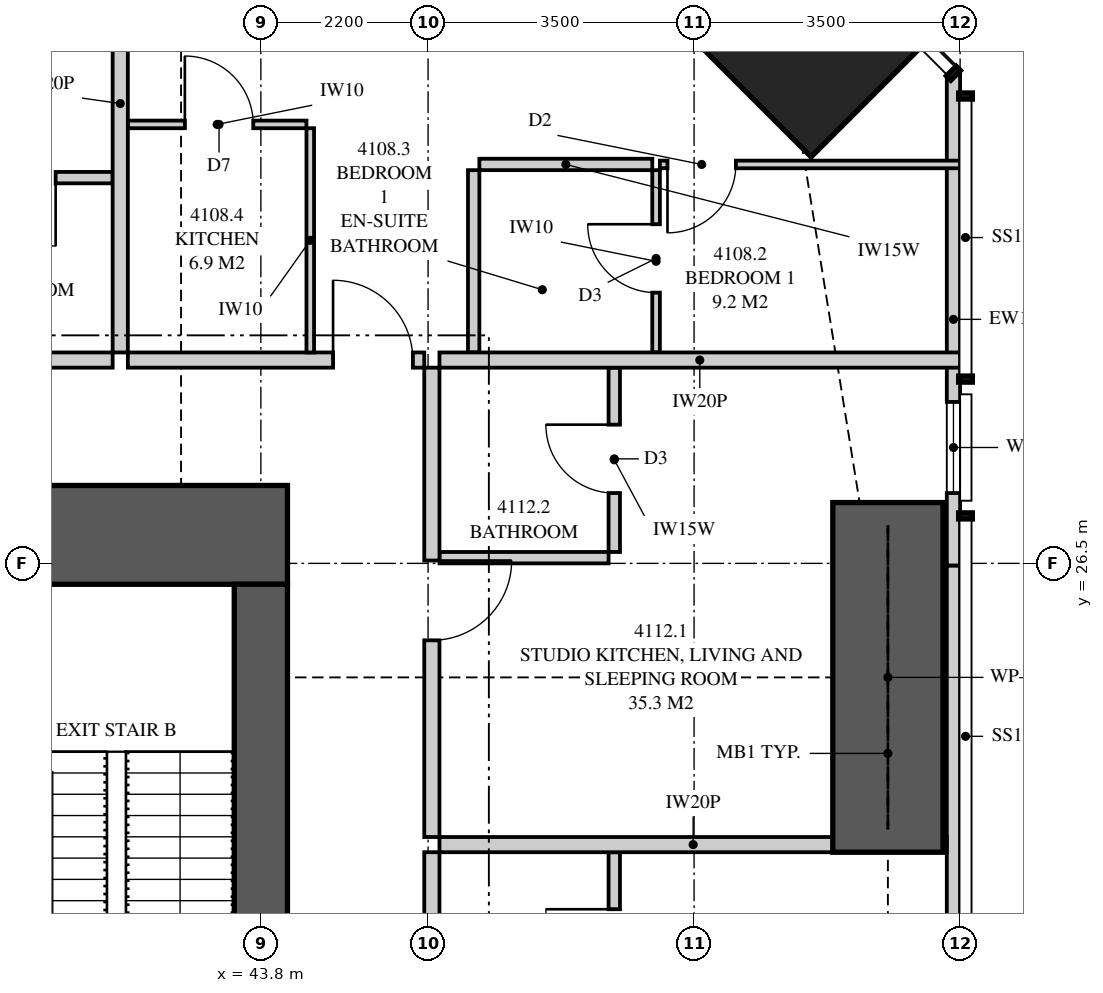
"""IFC4 building model, lengths in metres.
Left out: names, types, materials, properties, quantities, classifications, styles, units other than length and angle.
Written with IfcOpenShell. Run it as: python <this file> out.ifc"""

import sys

from ifc_helpers import new_model, si_unit, direction, frame, frame_2d, origin, origin_2d, place, context, subcontext, project, spatial, polyline, rectangle, hollow_rectangle, outline, extrude, element, fill, save


model = new_model("IFC4")
c1 = context("Model", 3, precision=1e-05, world=origin(), true_north=direction((0.0, 1.0)))
c2 = subcontext(c1, "Body", "Model", "MODEL_VIEW")
j1 = project(units=[si_unit("LENGTHUNIT", "METRE"), si_unit("PLANEANGLEUNIT", "RADIAN")], contexts=[c1])
p1 = place(None, origin())
s1 = spatial("IfcSite", under=j1, at=p1, CompositionType="ELEMENT")
p2 = place(p1, origin())
s2 = spatial("IfcBuilding", under=s1, at=p2, CompositionType="ELEMENT")
p3 = place(p2, frame((0.0, 0.0, 154.35)))
s3 = spatial("IfcBuildingStorey", under=s2, at=p3, CompositionType="ELEMENT", Elevation=154.35)
p4 = place(p3, frame((50.652, 33.652, 0.0), z_axis=(0.0, 0.0, 1.0), x_axis=(-0.707106781187, -0.707106781187, 0.0)))
e1 = element("IfcColumn", 1, at=p4, inside=s3, PredefinedType="COLUMN", context=c2, shape_type="SweptSolid", body=[
    extrude(hollow_rectangle(XDim=2.0, YDim=3.1, WallThickness=0.125, at=origin_2d()), origin(), (0.0, 0.0, 1.0), 3.35),
])
p5 = place(p3, frame((44.15, 26.875, 0.0), z_axis=(0.0, 0.0, 1.0), x_axis=(-1.0, 0.0, 0.0)))
e2 = element("IfcWall", 2, at=p5, inside=s3, PredefinedType="SHEAR", context=c2, shape_type="SweptSolid", body=[
    extrude(rectangle(XDim=8.25, YDim=1.3, at=frame_2d((4.125, 0.0))), origin(), (0.0, 0.0, 1.0), 3.35),
])
p6 = place(p5, frame((5.65, 0.0, 0.0)))
e3 = element("IfcOpeningElement", 3, at=p6, cuts=e2, PredefinedType="OPENING", context=c2, shape_type="SweptSolid", body=[
    extrude(rectangle(XDim=0.9, YDim=2.1, at=frame_2d((0.45, 1.05))), frame((0.0, 0.66, 0.0), z_axis=(0.0, -1.0, 0.0), x_axis=(1.0, 0.0, 0.0)), (0.0, 0.0, 1.0), 1.32),
])
p7 = place(p3, frame((43.8, 19.3, 0.0), z_axis=(0.0, 0.0, 1.0), x_axis=(0.0, 1.0, 0.0)))
e4 = element("IfcWall", 4, at=p7, inside=s3, PredefinedType="SHEAR", context=c2, shape_type="SweptSolid", body=[
    extrude(rectangle(XDim=6.925, YDim=0.7, at=frame_2d((3.462, 0.0))), origin(), (0.0, 0.0, 1.0), 3.35),
])
p8 = place(p3, frame((52.913, 11.221, 0.0), z_axis=(0.0, 0.0, 1.0), x_axis=(0.0, 1.0, 0.0)))
e5 = element("IfcWall", 5, at=p8, inside=s3, PredefinedType="SOLIDWALL", context=c2, shape_type="SweptSolid", body=[
    extrude(rectangle(XDim=15.251, YDim=0.175, at=frame_2d((7.625, 0.0))), origin(), (0.0, 0.0, 1.0), 2.15),
])
p9 = place(p8, frame((7.104, 0.0, 0.0)))
e6 = element("IfcOpeningElement", 6, at=p9, cuts=e5, PredefinedType="OPENING", context=c2, shape_type="SweptSolid", body=[
    extrude(rectangle(XDim=1.8, YDim=2.1, at=frame_2d((0.9, 1.05))), frame((0.0, 0.097, 0.0), z_axis=(0.0, -1.0, 0.0), x_axis=(1.0, 0.0, 0.0)), (0.0, 0.0, 1.0), 0.195),
])
p10 = place(p8, frame((4.179, 0.0, 0.4)))
e7 = element("IfcOpeningElement", 7, at=p10, cuts=e5, PredefinedType="OPENING", context=c2, shape_type="SweptSolid", body=[
    extrude(rectangle(XDim=2.4, YDim=1.7, at=frame_2d((1.2, 0.85))), frame((0.0, 0.097, 0.0), z_axis=(0.0, -1.0, 0.0), x_axis=(1.0, 0.0, 0.0)), (0.0, 0.0, 1.0), 0.195),
])
p11 = place(p3, frame((52.913, 26.472, 0.0), z_axis=(0.0, 0.0, 1.0), x_axis=(0.0, 1.0, 0.0)))
e8 = element("IfcWall", 8, at=p11, inside=s3, PredefinedType="SOLIDWALL", context=c2, shape_type="SweptSolid", body=[
    extrude(rectangle(XDim=6.477, YDim=0.175, at=frame_2d((3.238, 0.0))), origin(), (0.0, 0.0, 1.0), 3.11),
])
p12 = place(p11, frame((0.952, 0.0, 0.4)))
e9 = element("IfcOpeningElement", 9, at=p12, cuts=e8, PredefinedType="OPENING", context=c2, shape_type="SweptSolid", body=[
    extrude(rectangle(XDim=1.2, YDim=1.7, at=frame_2d((0.6, 0.85))), frame((0.0, 0.097, 0.0), z_axis=(0.0, -1.0, 0.0), x_axis=(1.0, 0.0, 0.0)), (0.0, 0.0, 1.0), 0.195),
])
p13 = place(p3, frame((41.95, 35.825, 0.0), z_axis=(0.0, 0.0, 1.0), x_axis=(0.0, -1.0, 0.0)))
e10 = element("IfcWall", 10, at=p13, inside=s3, PredefinedType="PARTITIONING", context=c2, shape_type="SweptSolid", body=[
    extrude(outline(polyline([(0.529, 2.15), (0.0, 2.15), (0.0, 0.302), (0.529, 0.302), (0.529, 0.782), (1.021, 0.782), (1.021, 0.302), (1.132, 0.302), (1.223, 0.205), (1.223, 0.0), (6.55, 0.0), (6.55, 3.11), (1.885, 3.11), (1.885, 2.15), (1.021, 2.15), (1.021, 1.218), (0.529, 1.218), (0.529, 2.15)])), frame((0.0, 0.1, 0.0), z_axis=(0.0, -1.0, 0.0), x_axis=(1.0, 0.0, 0.0)), (0.0, 0.0, 1.0), 0.2),
])
p14 = place(p3, frame((34.3, 29.175, 0.0), z_axis=(0.0, 0.0, 1.0), x_axis=(1.0, 0.0, 0.0)))
e11 = element("IfcWall", 11, at=p14, inside=s3, PredefinedType="PARTITIONING", context=c2, shape_type="SweptSolid", body=[
    extrude(rectangle(XDim=7.55, YDim=0.2, at=frame_2d((3.775, 0.0))), origin(), (0.0, 0.0, 1.0), 3.11),
])
p15 = place(p14, frame((3.275, 0.0, 0.0)))
e12 = element("IfcOpeningElement", 12, at=p15, cuts=e11, PredefinedType="OPENING", context=c2, shape_type="SweptSolid", body=[
    extrude(rectangle(XDim=1.05, YDim=2.2, at=frame_2d((0.525, 1.1))), frame((0.0, 0.11, 0.0), z_axis=(0.0, -1.0, 0.0), x_axis=(1.0, 0.0, 0.0)), (0.0, 0.0, 1.0), 0.22),
])
p16 = place(p3, frame((39.425, 31.575, 0.0), z_axis=(0.0, 0.0, 1.0), x_axis=(1.0, 0.0, 0.0)))
e13 = element("IfcWall", 13, at=p16, inside=s3, PredefinedType="PLUMBINGWALL", context=c2, shape_type="SweptSolid", body=[
    extrude(rectangle(XDim=2.425, YDim=0.15, at=frame_2d((1.212, 0.0))), origin(), (0.0, 0.0, 1.0), 3.11),
])
p17 = place(p16, frame((0.775, 0.0, 0.0)))
e14 = element("IfcOpeningElement", 14, at=p17, cuts=e13, PredefinedType="OPENING", context=c2, shape_type="SweptSolid", body=[
    extrude(rectangle(XDim=0.9, YDim=2.1, at=frame_2d((0.45, 1.05))), frame((0.0, 0.085, 0.0), z_axis=(0.0, -1.0, 0.0), x_axis=(1.0, 0.0, 0.0)), (0.0, 0.0, 1.0), 0.17),
])
p18 = place(p3, frame((42.05, 29.175, 0.0), z_axis=(0.0, 0.0, 1.0), x_axis=(1.0, 0.0, 0.0)))
e15 = element("IfcWall", 15, at=p18, inside=s3, PredefinedType="PARTITIONING", context=c2, shape_type="SweptSolid", body=[
    extrude(outline(polyline([(0.0, 0.0), (3.9, 0.0), (3.9, 3.11), (1.046, 3.11), (1.046, 2.531), (0.354, 2.531), (0.354, 3.11), (0.0, 3.11), (0.0, 0.0)])), frame((0.0, 0.1, 0.0), z_axis=(0.0, -1.0, 0.0), x_axis=(1.0, 0.0, 0.0)), (0.0, 0.0, 1.0), 0.2),
])
p19 = place(p18, frame((2.7, 0.0, 0.0)))
e16 = element("IfcOpeningElement", 16, at=p19, cuts=e15, PredefinedType="OPENING", context=c2, shape_type="SweptSolid", body=[
    extrude(rectangle(XDim=1.05, YDim=2.2, at=frame_2d((0.525, 1.1))), frame((0.0, 0.11, 0.0), z_axis=(0.0, -1.0, 0.0), x_axis=(1.0, 0.0, 0.0)), (0.0, 0.0, 1.0), 0.22),
])
p20 = place(p3, frame((49.0, 31.673, 0.0), z_axis=(0.0, 0.0, 1.0), x_axis=(0.0, -1.0, 0.0)))
e17 = element("IfcWall", 17, at=p20, inside=s3, PredefinedType="PARTITIONING", context=c2, shape_type="SweptSolid", body=[
    extrude(rectangle(XDim=2.398, YDim=0.1, at=frame_2d((1.199, 0.0))), origin(), (0.0, 0.0, 1.0), 3.11),
])
p21 = place(p20, frame((0.712, 0.0, 0.0)))
e18 = element("IfcOpeningElement", 18, at=p21, cuts=e17, PredefinedType="OPENING", context=c2, shape_type="SweptSolid", body=[
    extrude(rectangle(XDim=0.9, YDim=2.1, at=frame_2d((0.45, 1.05))), frame((0.0, 0.06, 0.0), z_axis=(0.0, -1.0, 0.0), x_axis=(1.0, 0.0, 0.0)), (0.0, 0.0, 1.0), 0.12),
])
p22 = place(p3, frame((49.05, 31.748, 0.0), z_axis=(0.0, 0.0, 1.0), x_axis=(1.0, 0.0, 0.0)))
e19 = element("IfcWall", 19, at=p22, inside=s3, PredefinedType="PARTITIONING", context=c2, shape_type="SweptSolid", body=[
    extrude(outline(polyline([(0.835, 3.11), (0.0, 3.11), (0.0, 0.0), (2.361, 0.0), (2.424, 0.335), (2.821, 0.185), (2.821, 0.0), (3.95, 0.0), (3.95, 3.11), (2.983, 3.11), (2.983, 2.15), (0.835, 2.15), (0.835, 3.11)])), frame((0.0, 0.05, 0.0), z_axis=(0.0, -1.0, 0.0), x_axis=(1.0, 0.0, 0.0)), (0.0, 0.0, 1.0), 0.1),
])
p23 = place(p22, frame((0.1, 0.0, 0.0)))
e20 = element("IfcOpeningElement", 20, at=p23, cuts=e19, PredefinedType="OPENING", context=c2, shape_type="SweptSolid", body=[
    extrude(rectangle(XDim=0.9, YDim=2.1, at=frame_2d((0.45, 1.05))), frame((0.0, 0.06, 0.0), z_axis=(0.0, -1.0, 0.0), x_axis=(1.0, 0.0, 0.0)), (0.0, 0.0, 1.0), 0.12),
])
p24 = place(p3, frame((46.675, 31.748, 0.0), z_axis=(0.0, 0.0, 1.0), x_axis=(1.0, 0.0, 0.0)))
e21 = element("IfcWall", 21, at=p24, inside=s3, PredefinedType="PLUMBINGWALL", context=c2, shape_type="SweptSolid", body=[
    extrude(rectangle(XDim=2.275, YDim=0.15, at=frame_2d((1.137, 0.0))), origin(), (0.0, 0.0, 1.0), 3.11),
])
p25 = place(p3, frame((46.6, 31.673, 0.0), z_axis=(0.0, 0.0, 1.0), x_axis=(0.0, -1.0, 0.0)))
e22 = element("IfcWall", 22, at=p25, inside=s3, PredefinedType="PLUMBINGWALL", context=c2, shape_type="SweptSolid", body=[
    extrude(rectangle(XDim=2.398, YDim=0.15, at=frame_2d((1.199, 0.0))), origin(), (0.0, 0.0, 1.0), 3.11),
])
p26 = place(p3, frame((42.05, 32.275, 0.0), z_axis=(0.0, 0.0, 1.0), x_axis=(1.0, 0.0, 0.0)))
e23 = element("IfcWall", 23, at=p26, inside=s3, PredefinedType="PARTITIONING", context=c2, shape_type="SweptSolid", body=[
    extrude(outline(polyline([(0.0, 0.0), (2.35, 0.0), (2.35, 3.11), (0.996, 3.11), (0.996, 2.531), (0.404, 2.531), (0.404, 3.11), (0.0, 3.11), (0.0, 0.0)])), frame((0.0, 0.05, 0.0), z_axis=(0.0, -1.0, 0.0), x_axis=(1.0, 0.0, 0.0)), (0.0, 0.0, 1.0), 0.1),
])
p27 = place(p26, frame((0.75, 0.0, 0.0)))
e24 = element("IfcOpeningElement", 24, at=p27, cuts=e23, PredefinedType="OPENING", context=c2, shape_type="SweptSolid", body=[
    extrude(rectangle(XDim=0.9, YDim=2.1, at=frame_2d((0.45, 1.05))), frame((0.0, 0.06, 0.0), z_axis=(0.0, -1.0, 0.0), x_axis=(1.0, 0.0, 0.0)), (0.0, 0.0, 1.0), 0.12),
])
p28 = place(p3, frame((44.45, 32.225, 0.0), z_axis=(0.0, 0.0, 1.0), x_axis=(0.0, -1.0, 0.0)))
e25 = element("IfcWall", 25, at=p28, inside=s3, PredefinedType="PARTITIONING", context=c2, shape_type="SweptSolid", body=[
    extrude(rectangle(XDim=2.95, YDim=0.1, at=frame_2d((1.475, 0.0))), origin(), (0.0, 0.0, 1.0), 3.11),
])
p29 = place(p3, frame((46.15, 29.175, 0.0), z_axis=(0.0, 0.0, 1.0), x_axis=(1.0, 0.0, 0.0)))
e26 = element("IfcWall", 26, at=p29, inside=s3, PredefinedType="PARTITIONING", context=c2, shape_type="SweptSolid", body=[
    extrude(outline(polyline([(0.0, 0.0), (6.85, 0.0), (6.85, 3.11), (6.35, 3.11), (6.35, 2.15), (4.101, 2.15), (4.101, 3.11), (0.0, 3.11), (0.0, 0.0)])), frame((0.0, 0.1, 0.0), z_axis=(0.0, -1.0, 0.0), x_axis=(1.0, 0.0, 0.0)), (0.0, 0.0, 1.0), 0.2),
])
p30 = place(p3, frame((52.825, 22.8, 0.0), z_axis=(0.0, 0.0, 1.0), x_axis=(-1.0, 0.0, 0.0)))
e27 = element("IfcWall", 27, at=p30, inside=s3, PredefinedType="PARTITIONING", context=c2, shape_type="SweptSolid", body=[
    extrude(outline(polyline([(0.0, 0.0), (6.675, 0.0), (6.675, 3.11), (1.885, 3.11), (1.885, 2.15), (0.0, 2.15), (0.0, 3.11), (0.0, 0.0)])), frame((0.0, 0.1, 0.0), z_axis=(0.0, -1.0, 0.0), x_axis=(1.0, 0.0, 0.0)), (0.0, 0.0, 1.0), 0.2),
])
p31 = place(p3, frame((46.05, 14.6, 0.0), z_axis=(0.0, 0.0, 1.0), x_axis=(0.0, 1.0, 0.0)))
e28 = element("IfcWall", 28, at=p31, inside=s3, PredefinedType="PARTITIONING", context=c2, shape_type="SweptSolid", body=[
    extrude(rectangle(XDim=8.1, YDim=0.2, at=frame_2d((4.05, 0.0))), origin(), (0.0, 0.0, 1.0), 3.11),
])
p32 = place(p31, frame((3.55, 0.0, 0.0)))
e29 = element("IfcOpeningElement", 29, at=p32, cuts=e28, PredefinedType="OPENING", context=c2, shape_type="SweptSolid", body=[
    extrude(rectangle(XDim=1.05, YDim=2.2, at=frame_2d((0.525, 1.1))), frame((0.0, 0.11, 0.0), z_axis=(0.0, -1.0, 0.0), x_axis=(1.0, 0.0, 0.0)), (0.0, 0.0, 1.0), 0.22),
])
p33 = place(p3, frame((48.45, 20.275, 0.0), z_axis=(0.0, 0.0, 1.0), x_axis=(0.0, 1.0, 0.0)))
e30 = element("IfcWall", 30, at=p33, inside=s3, PredefinedType="PLUMBINGWALL", context=c2, shape_type="SweptSolid", body=[
    extrude(rectangle(XDim=2.425, YDim=0.15, at=frame_2d((1.212, 0.0))), origin(), (0.0, 0.0, 1.0), 3.11),
])
p34 = place(p33, frame((0.775, 0.0, 0.0)))
e31 = element("IfcOpeningElement", 31, at=p34, cuts=e30, PredefinedType="OPENING", context=c2, shape_type="SweptSolid", body=[
    extrude(rectangle(XDim=0.9, YDim=2.1, at=frame_2d((0.45, 1.05))), frame((0.0, 0.085, 0.0), z_axis=(0.0, -1.0, 0.0), x_axis=(1.0, 0.0, 0.0)), (0.0, 0.0, 1.0), 0.17),
])
p35 = place(p3, frame((46.05, 22.9, 0.0), z_axis=(0.0, 0.0, 1.0), x_axis=(0.0, 1.0, 0.0)))
e32 = element("IfcWall", 32, at=p35, inside=s3, PredefinedType="PARTITIONING", context=c2, shape_type="SweptSolid", body=[
    extrude(outline(polyline([(0.0, 0.0), (6.175, 0.0), (6.175, 3.11), (2.446, 3.11), (2.446, 2.531), (1.754, 2.531), (1.754, 3.11), (0.0, 3.11), (0.0, 0.0)])), frame((0.0, 0.1, 0.0), z_axis=(0.0, -1.0, 0.0), x_axis=(1.0, 0.0, 0.0)), (0.0, 0.0, 1.0), 0.2),
])
p36 = place(p35, frame((2.587, 0.0, 0.0)))
e33 = element("IfcOpeningElement", 33, at=p36, cuts=e32, PredefinedType="OPENING", context=c2, shape_type="SweptSolid", body=[
    extrude(rectangle(XDim=1.05, YDim=2.2, at=frame_2d((0.525, 1.1))), frame((0.0, 0.11, 0.0), z_axis=(0.0, -1.0, 0.0), x_axis=(1.0, 0.0, 0.0)), (0.0, 0.0, 1.0), 0.22),
])
p37 = place(p3, frame((48.45, 26.65, 0.0), z_axis=(0.0, 0.0, 1.0), x_axis=(0.0, 1.0, 0.0)))
e34 = element("IfcWall", 34, at=p37, inside=s3, PredefinedType="PLUMBINGWALL", context=c2, shape_type="SweptSolid", body=[
    extrude(rectangle(XDim=2.425, YDim=0.15, at=frame_2d((1.212, 0.0))), origin(), (0.0, 0.0, 1.0), 3.11),
])
p38 = place(p37, frame((0.775, 0.0, 0.0)))
e35 = element("IfcOpeningElement", 35, at=p38, cuts=e34, PredefinedType="OPENING", context=c2, shape_type="SweptSolid", body=[
    extrude(rectangle(XDim=0.9, YDim=2.1, at=frame_2d((0.45, 1.05))), frame((0.0, 0.085, 0.0), z_axis=(0.0, -1.0, 0.0), x_axis=(1.0, 0.0, 0.0)), (0.0, 0.0, 1.0), 0.17),
])
p39 = place(p3, frame((48.375, 26.575, 0.0), z_axis=(0.0, 0.0, 1.0), x_axis=(-1.0, 0.0, 0.0)))
e36 = element("IfcWall", 36, at=p39, inside=s3, PredefinedType="PLUMBINGWALL", context=c2, shape_type="SweptSolid", body=[
    extrude(rectangle(XDim=2.225, YDim=0.15, at=frame_2d((1.113, 0.0))), origin(), (0.0, 0.0, 1.0), 3.11),
])
p40 = place(p3, frame((52.05, 22.7, 0.0), z_axis=(0.0, 0.0, 1.0), x_axis=(0.0, 1.0, 0.0)))
e37 = element("IfcWall", 37, at=p40, inside=s3, PredefinedType="SHEAR", context=c2, shape_type="SweptSolid", body=[
    extrude(rectangle(XDim=4.6, YDim=1.45, at=frame_2d((2.3, 0.0))), origin(), (0.0, 0.0, 1.0), 3.35),
])
p41 = place(p12, origin())
e38 = element("IfcWindow", 38, at=p41, inside=s3, PartitioningType="SINGLE_PANEL", PredefinedType="WINDOW", context=c2, shape_type="SweptSolid", body=[
    extrude(rectangle(XDim=1.2, YDim=1.7, at=frame_2d((0.6, 0.85))), frame((0.0, 0.03, 0.0), z_axis=(0.0, -1.0, 0.0), x_axis=(1.0, 0.0, 0.0)), (0.0, 0.0, 1.0), 0.06),
])
fill(e9, e38)
p42 = place(p17, frame((0.9, 0.0, 0.0), z_axis=(0.0, 0.0, 1.0), x_axis=(-1.0, 0.0, 0.0)))
e39 = element("IfcDoor", 39, at=p42, inside=s3, OperationType="SINGLE_SWING_LEFT", PredefinedType="DOOR", context=c2, shape_type="SweptSolid", body=[
    extrude(rectangle(XDim=0.9, YDim=2.1, at=frame_2d((0.45, 1.05))), frame((0.0, 0.025, 0.0), z_axis=(0.0, -1.0, 0.0), x_axis=(1.0, 0.0, 0.0)), (0.0, 0.0, 1.0), 0.05),
])
fill(e14, e39)
p43 = place(p19, origin())
e40 = element("IfcDoor", 40, at=p43, inside=s3, OperationType="SINGLE_SWING_LEFT", PredefinedType="DOOR", context=c2, shape_type="SweptSolid", body=[
    extrude(rectangle(XDim=1.05, YDim=2.2, at=frame_2d((0.525, 1.1))), frame((0.0, 0.025, 0.0), z_axis=(0.0, -1.0, 0.0), x_axis=(1.0, 0.0, 0.0)), (0.0, 0.0, 1.0), 0.05),
])
fill(e16, e40)
p44 = place(p23, frame((0.9, 0.0, 0.0), z_axis=(0.0, 0.0, 1.0), x_axis=(-1.0, 0.0, 0.0)))
e41 = element("IfcDoor", 41, at=p44, inside=s3, OperationType="SINGLE_SWING_RIGHT", PredefinedType="DOOR", context=c2, shape_type="SweptSolid", body=[
    extrude(rectangle(XDim=0.9, YDim=2.1, at=frame_2d((0.45, 1.05))), frame((0.0, 0.025, 0.0), z_axis=(0.0, -1.0, 0.0), x_axis=(1.0, 0.0, 0.0)), (0.0, 0.0, 1.0), 0.05),
])
fill(e20, e41)
p45 = place(p21, frame((0.9, 0.0, 0.0), z_axis=(0.0, 0.0, 1.0), x_axis=(-1.0, 0.0, 0.0)))
e42 = element("IfcDoor", 42, at=p45, inside=s3, OperationType="SINGLE_SWING_RIGHT", PredefinedType="DOOR", context=c2, shape_type="SweptSolid", body=[
    extrude(rectangle(XDim=0.9, YDim=2.1, at=frame_2d((0.45, 1.05))), frame((0.0, 0.025, 0.0), z_axis=(0.0, -1.0, 0.0), x_axis=(1.0, 0.0, 0.0)), (0.0, 0.0, 1.0), 0.05),
])
fill(e18, e42)
p46 = place(p27, origin())
e43 = element("IfcDoor", 43, at=p46, inside=s3, OperationType="SINGLE_SWING_LEFT", PredefinedType="DOOR", context=c2, shape_type="SweptSolid", body=[
    extrude(rectangle(XDim=0.9, YDim=2.1, at=frame_2d((0.45, 1.05))), frame((0.0, 0.025, 0.0), z_axis=(0.0, -1.0, 0.0), x_axis=(1.0, 0.0, 0.0)), (0.0, 0.0, 1.0), 0.05),
])
fill(e24, e43)
p47 = place(p34, origin())
e44 = element("IfcDoor", 44, at=p47, inside=s3, OperationType="SINGLE_SWING_RIGHT", PredefinedType="DOOR", context=c2, shape_type="SweptSolid", body=[
    extrude(rectangle(XDim=0.9, YDim=2.1, at=frame_2d((0.45, 1.05))), frame((0.0, 0.025, 0.0), z_axis=(0.0, -1.0, 0.0), x_axis=(1.0, 0.0, 0.0)), (0.0, 0.0, 1.0), 0.05),
])
fill(e31, e44)
p48 = place(p36, frame((1.05, 0.0, 0.0), z_axis=(0.0, 0.0, 1.0), x_axis=(-1.0, 0.0, 0.0)))
e45 = element("IfcDoor", 45, at=p48, inside=s3, OperationType="SINGLE_SWING_LEFT", PredefinedType="DOOR", context=c2, shape_type="SweptSolid", body=[
    extrude(rectangle(XDim=1.05, YDim=2.2, at=frame_2d((0.525, 1.1))), frame((0.0, 0.025, 0.0), z_axis=(0.0, -1.0, 0.0), x_axis=(1.0, 0.0, 0.0)), (0.0, 0.0, 1.0), 0.05),
])
fill(e33, e45)
p49 = place(p38, origin())
e46 = element("IfcDoor", 46, at=p49, inside=s3, OperationType="SINGLE_SWING_RIGHT", PredefinedType="DOOR", context=c2, shape_type="SweptSolid", body=[
    extrude(rectangle(XDim=0.9, YDim=2.1, at=frame_2d((0.45, 1.05))), frame((0.0, 0.025, 0.0), z_axis=(0.0, -1.0, 0.0), x_axis=(1.0, 0.0, 0.0)), (0.0, 0.0, 1.0), 0.05),
])
fill(e35, e46)
save(model, sys.argv[1])
